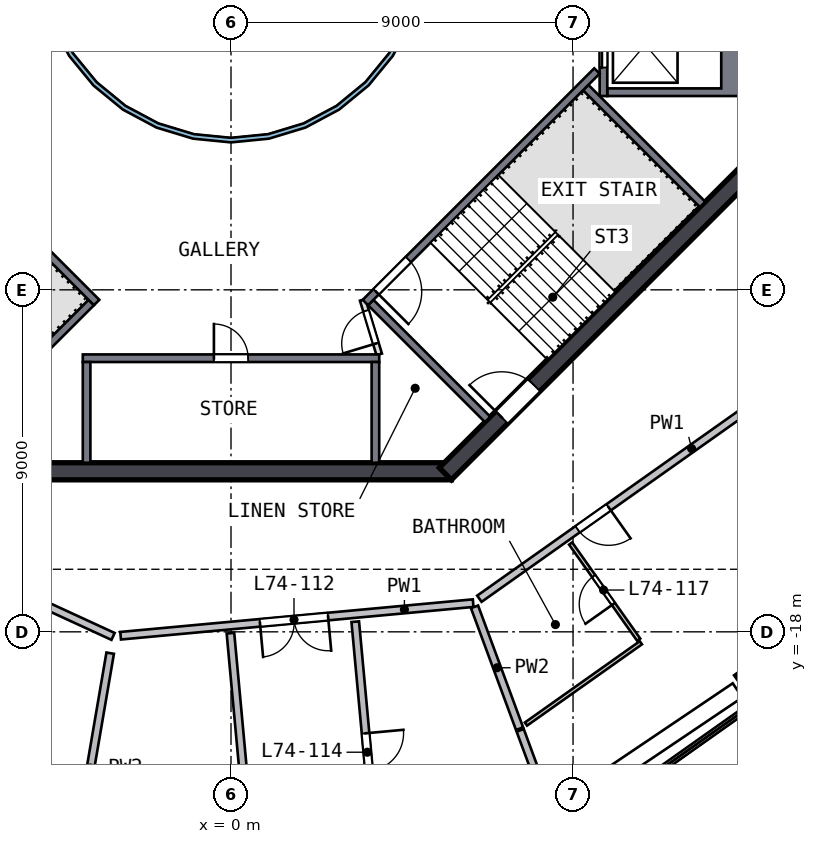
"""IFC4 building model, lengths in metres.
Left out: names, types, materials, properties, quantities, classifications, styles, units other than length and angle.
Written with IfcOpenShell. Run it as: python <this file> out.ifc"""

import sys

from ifc_helpers import new_model, si_unit, direction, frame, frame_2d, origin, origin_2d, place, context, subcontext, project, spatial, polyline, rectangle, outline, extrude, element, fill, save


model = new_model("IFC4")
c1 = context("Model", 3, precision=1e-05, world=origin(), true_north=direction((0.0, 1.0)))
c2 = subcontext(c1, "Body", "Model", "MODEL_VIEW")
j1 = project(units=[si_unit("LENGTHUNIT", "METRE"), si_unit("PLANEANGLEUNIT", "RADIAN")], contexts=[c1])
p1 = place(None, origin())
s1 = spatial("IfcSite", under=j1, at=p1, CompositionType="ELEMENT")
p2 = place(p1, origin())
s2 = spatial("IfcBuilding", under=s1, at=p2, CompositionType="ELEMENT")
p3 = place(p2, frame((0.0, 0.0, 299.5)))
s3 = spatial("IfcBuildingStorey", under=s2, at=p3, CompositionType="ELEMENT", Elevation=299.5)
p4 = place(p3, frame((13.664, -19.313, 0.0), z_axis=(0.09133384, 0.065781659, 0.99364526), x_axis=(0.811187112, 0.573853007, -0.112553082)))
e1 = element("IfcColumn", 1, at=p4, inside=s3, PredefinedType="COLUMN", context=c2, shape_type="SweptSolid", body=[
    extrude(rectangle(XDim=0.7, YDim=0.7, at=origin_2d()), origin(), (0.0, 0.0, 1.0), 3.21),
])
p5 = place(p3, frame((-5.799, -13.775, 0.0), z_axis=(0.0, 0.0, 1.0), x_axis=(1.0, 0.0, 0.0)))
e2 = element("IfcWall", 2, at=p5, inside=s3, PredefinedType="SHEAR", context=c2, shape_type="SweptSolid", body=[
    extrude(rectangle(XDim=11.598, YDim=0.45, at=frame_2d((5.799, 0.0))), origin(), (0.0, 0.0, 1.0), 3.5),
])
p6 = place(p3, frame((5.64, -13.841, 0.0), z_axis=(0.0, 0.0, 1.0), x_axis=(0.707106781, 0.707106781, 0.0)))
e3 = element("IfcWall", 3, at=p6, inside=s3, PredefinedType="SHEAR", context=c2, shape_type="SweptSolid", body=[
    extrude(rectangle(XDim=11.598, YDim=0.45, at=frame_2d((5.799, 0.0))), origin(), (0.0, 0.0, 1.0), 3.5),
])
p7 = place(p6, frame((2.099, 0.0, 0.0)))
e4 = element("IfcOpeningElement", 4, at=p7, cuts=e3, PredefinedType="OPENING", context=c2, shape_type="SweptSolid", body=[
    extrude(rectangle(XDim=1.2, YDim=2.1, at=frame_2d((0.6, 1.05))), frame((0.0, 0.235, 0.0), z_axis=(0.0, -1.0, 0.0), x_axis=(1.0, 0.0, 0.0)), (0.0, 0.0, 1.0), 0.47),
])
p8 = place(p3, origin())
e5 = element("IfcWall", 5, at=p8, inside=s3, PredefinedType="SOLIDWALL", context=c2, shape_type="SweptSolid", body=[
    extrude(outline(polyline([(13.55, -3.9), (9.9, -3.9), (9.9, -3.7), (12.9, -3.7), (12.9, -1.4), (9.9, -1.4), (9.9, -1.2), (13.55, -1.2), (13.55, -3.9)])), origin(), (0.0, 0.0, 1.0), 3.19),
])
p9 = place(p3, frame((9.8, -1.2, 0.0), z_axis=(0.0, 0.0, 1.0), x_axis=(0.0, -1.0, 0.0)))
e6 = element("IfcWall", 6, at=p9, inside=s3, PredefinedType="SOLIDWALL", context=c2, shape_type="SweptSolid", body=[
    extrude(rectangle(XDim=2.7, YDim=0.2, at=frame_2d((1.35, 0.0))), origin(), (0.0, 0.0, 1.0), 3.19),
])
p10 = place(p9, frame((0.75, 0.0, 0.0)))
e7 = element("IfcOpeningElement", 7, at=p10, cuts=e6, PredefinedType="OPENING", context=c2, shape_type="SweptSolid", body=[
    extrude(rectangle(XDim=1.2, YDim=2.1, at=frame_2d((0.6, 1.05))), frame((0.0, 0.11, 0.0), z_axis=(0.0, -1.0, 0.0), x_axis=(1.0, 0.0, 0.0)), (0.0, 0.0, 1.0), 0.22),
])
p11 = place(p3, frame((-3.9, -10.8, 0.0), z_axis=(0.0, 0.0, 1.0), x_axis=(1.0, 0.0, 0.0)))
e8 = element("IfcWall", 8, at=p11, inside=s3, PredefinedType="SOLIDWALL", context=c2, shape_type="SweptSolid", body=[
    extrude(rectangle(XDim=7.8, YDim=0.2, at=frame_2d((3.9, 0.0))), origin(), (0.0, 0.0, 1.0), 3.19),
])
p12 = place(p11, frame((3.45, 0.0, 0.0)))
e9 = element("IfcOpeningElement", 9, at=p12, cuts=e8, PredefinedType="OPENING", context=c2, shape_type="SweptSolid", body=[
    extrude(rectangle(XDim=0.9, YDim=2.1, at=frame_2d((0.45, 1.05))), frame((0.0, 0.11, 0.0), z_axis=(0.0, -1.0, 0.0), x_axis=(1.0, 0.0, 0.0)), (0.0, 0.0, 1.0), 0.22),
])
for number, where, z_axis, x_axis in (
    (10, (-3.8, -10.9, 0.0), (0.0, 0.0, 1.0), (0.0, -1.0, 0.0)),
    (11, (3.8, -10.9, 0.0), (0.0, 0.0, 1.0), (0.0, -1.0, 0.0)),
):
    element("IfcWall", number, at=place(p3, frame(where, z_axis=z_axis, x_axis=x_axis)), inside=s3, PredefinedType="SOLIDWALL", context=c2, shape_type="SweptSolid", body=[
        extrude(rectangle(XDim=2.65, YDim=0.2, at=frame_2d((1.325, 0.0))), origin(), (0.0, 0.0, 1.0), 3.19),
    ])
p13 = place(p3, frame((-3.535, -9.334, 0.0), z_axis=(0.0, 0.0, 1.0), x_axis=(-0.707120946, 0.707092617, 0.0)))
e12 = element("IfcWall", 12, at=p13, inside=s3, PredefinedType="SOLIDWALL", context=c2, shape_type="SweptSolid", body=[
    extrude(rectangle(XDim=8.618, YDim=0.2, at=frame_2d((4.309, 0.0))), origin(), (0.0, 0.0, 1.0), 3.19),
])
p14 = place(p13, frame((6.6, 0.0, 0.0)))
e13 = element("IfcOpeningElement", 13, at=p14, cuts=e12, PredefinedType="OPENING", context=c2, shape_type="SweptSolid", body=[
    extrude(rectangle(XDim=1.2, YDim=2.1, at=frame_2d((0.6, 1.05))), frame((0.0, 0.11, 0.0), z_axis=(0.0, -1.0, 0.0), x_axis=(1.0, 0.0, 0.0)), (0.0, 0.0, 1.0), 0.22),
])
p15 = place(p3, frame((-3.677, -9.334, 0.0), z_axis=(0.0, 0.0, 1.0), x_axis=(-0.707106781, -0.707106781, 0.0)))
e14 = element("IfcWall", 14, at=p15, inside=s3, PredefinedType="SOLIDWALL", context=c2, shape_type="SweptSolid", body=[
    extrude(rectangle(XDim=4.35, YDim=0.2, at=frame_2d((2.175, 0.0))), origin(), (0.0, 0.0, 1.0), 3.19),
])
p16 = place(p3, frame((9.629, -3.24, 0.0), z_axis=(0.0, 0.0, 1.0), x_axis=(-0.707120946, -0.707092617, 0.0)))
e15 = element("IfcWall", 15, at=p16, inside=s3, PredefinedType="SOLIDWALL", context=c2, shape_type="SweptSolid", body=[
    extrude(rectangle(XDim=8.618, YDim=0.2, at=frame_2d((4.309, 0.0))), origin(), (0.0, 0.0, 1.0), 3.19),
])
p17 = place(p16, frame((7.018, 0.0, 0.0)))
e16 = element("IfcOpeningElement", 16, at=p17, cuts=e15, PredefinedType="OPENING", context=c2, shape_type="SweptSolid", body=[
    extrude(rectangle(XDim=1.2, YDim=2.1, at=frame_2d((0.6, 1.05))), frame((0.0, 0.11, 0.0), z_axis=(0.0, -1.0, 0.0), x_axis=(1.0, 0.0, 0.0)), (0.0, 0.0, 1.0), 0.22),
])
for number, where, z_axis, x_axis in (
    (17, (3.677, -9.334, 0.0), (0.0, 0.0, 1.0), (0.707, -0.707, 0.0)),
    (18, (9.334, -3.677, 0.0), (0.0, 0.0, 1.0), (0.707, -0.707, 0.0)),
):
    element("IfcWall", number, at=place(p3, frame(where, z_axis=z_axis, x_axis=x_axis)), inside=s3, PredefinedType="SOLIDWALL", context=c2, shape_type="SweptSolid", body=[
        extrude(rectangle(XDim=4.35, YDim=0.2, at=frame_2d((2.175, 0.0))), origin(), (0.0, 0.0, 1.0), 3.19),
    ])
p18 = place(p3, frame((3.9, -10.7, 0.0), z_axis=(0.0, 0.0, 1.0), x_axis=(-0.289808785, 0.957084567, 0.0)))
e19 = element("IfcWall", 19, at=p18, inside=s3, PredefinedType="PARTITIONING", context=c2, shape_type="SweptSolid", body=[
    extrude(rectangle(XDim=1.501, YDim=0.15, at=frame_2d((0.75, 0.0))), origin(), (0.0, 0.0, 1.0), 3.19),
])
p19 = place(p18, frame((0.301, 0.0, 0.0)))
e20 = element("IfcOpeningElement", 20, at=p19, cuts=e19, PredefinedType="OPENING", context=c2, shape_type="SweptSolid", body=[
    extrude(rectangle(XDim=0.9, YDim=2.1, at=frame_2d((0.45, 1.05))), frame((0.0, 0.085, 0.0), z_axis=(0.0, -1.0, 0.0), x_axis=(1.0, 0.0, 0.0)), (0.0, 0.0, 1.0), 0.17),
])
p20 = place(p3, origin())
e21 = element("IfcWall", 21, at=p20, inside=s3, PredefinedType="SOLIDWALL", context=c2, shape_type="SweptSolid", body=[
    extrude(outline(polyline([(5.021, -0.999), (4.73, -1.959), (4.257, -2.844), (3.62, -3.62), (2.844, -4.257), (1.959, -4.73), (0.999, -5.021), (0.0, -5.12), (-0.999, -5.021), (-1.959, -4.73), (-2.844, -4.257), (-3.62, -3.62), (-4.257, -2.844), (-4.73, -1.959), (-5.021, -0.999), (-5.12, 0.0), (-5.021, 0.999), (-4.73, 1.959), (-4.257, 2.844), (-3.62, 3.62), (-2.844, 4.257), (-1.959, 4.73), (-0.999, 5.021), (0.0, 5.12), (0.999, 5.021), (1.959, 4.73), (2.844, 4.257), (3.62, 3.62), (4.257, 2.844), (4.73, 1.959), (5.021, 0.999), (5.12, 0.0), (5.021, -0.999)]), holes=[polyline([(4.904, 0.976), (4.619, 1.913), (4.157, 2.778), (3.535, 3.535), (2.778, 4.157), (1.913, 4.619), (0.976, 4.904), (0.0, 5.0), (-0.976, 4.904), (-1.913, 4.619), (-2.778, 4.157), (-3.535, 3.535), (-4.157, 2.778), (-4.619, 1.913), (-4.904, 0.976), (-5.0, 0.0), (-4.904, -0.976), (-4.619, -1.913), (-4.157, -2.778), (-3.535, -3.535), (-2.778, -4.157), (-1.913, -4.619), (-0.976, -4.904), (0.0, -5.0), (0.976, -4.904), (1.913, -4.619), (2.778, -4.157), (3.535, -3.535), (4.157, -2.778), (4.619, -1.913), (4.904, -0.976), (5.0, 0.0), (4.904, 0.976)])]), origin(), (0.0, 0.0, 1.0), 3.19),
])
p21 = place(p3, frame((-3.104, -18.121, 0.0), z_axis=(0.0, 0.0, 1.0), x_axis=(-0.908365452, 0.418177241, 0.0)))
e22 = element("IfcWall", 22, at=p21, inside=s3, PredefinedType="SOLIDWALL", context=c2, shape_type="SweptSolid", body=[
    extrude(rectangle(XDim=9.317, YDim=0.2, at=frame_2d((4.658, 0.0))), origin(), (0.0, 0.0, 1.0), 3.19),
])
p22 = place(p21, frame((5.15, 0.0, 0.0)))
e23 = element("IfcOpeningElement", 23, at=p22, cuts=e22, PredefinedType="OPENING", context=c2, shape_type="SweptSolid", body=[
    extrude(rectangle(XDim=1.0, YDim=2.1, at=frame_2d((0.5, 1.05))), frame((0.0, 0.11, 0.0), z_axis=(0.0, -1.0, 0.0), x_axis=(1.0, 0.0, 0.0)), (0.0, 0.0, 1.0), 0.22),
])
p23 = place(p3, frame((6.372, -17.245, 0.0), z_axis=(0.0, 0.0, 1.0), x_axis=(-0.995756119, -0.092031251, 0.0)))
e24 = element("IfcWall", 24, at=p23, inside=s3, PredefinedType="SOLIDWALL", context=c2, shape_type="SweptSolid", body=[
    extrude(rectangle(XDim=9.317, YDim=0.2, at=frame_2d((4.658, 0.0))), origin(), (0.0, 0.0, 1.0), 3.19),
])
p24 = place(p23, frame((3.835, 0.0, 0.0)))
e25 = element("IfcOpeningElement", 25, at=p24, cuts=e24, PredefinedType="OPENING", context=c2, shape_type="SweptSolid", body=[
    extrude(rectangle(XDim=1.8, YDim=2.1, at=frame_2d((0.9, 1.05))), frame((0.0, 0.11, 0.0), z_axis=(0.0, -1.0, 0.0), x_axis=(1.0, 0.0, 0.0)), (0.0, 0.0, 1.0), 0.22),
])
p25 = place(p3, frame((14.141, -11.749, 0.0), z_axis=(0.0, 0.0, 1.0), x_axis=(-0.816328241, -0.577588264, 0.0)))
e26 = element("IfcWall", 26, at=p25, inside=s3, PredefinedType="SOLIDWALL", context=c2, shape_type="SweptSolid", body=[
    extrude(rectangle(XDim=9.316, YDim=0.2, at=frame_2d((4.658, 0.0))), origin(), (0.0, 0.0, 1.0), 3.19),
])
p26 = place(p25, frame((5.15, 0.0, 0.0)))
e27 = element("IfcOpeningElement", 27, at=p26, cuts=e26, PredefinedType="OPENING", context=c2, shape_type="SweptSolid", body=[
    extrude(rectangle(XDim=1.0, YDim=2.1, at=frame_2d((0.5, 1.05))), frame((0.0, 0.11, 0.0), z_axis=(0.0, -1.0, 0.0), x_axis=(1.0, 0.0, 0.0)), (0.0, 0.0, 1.0), 0.22),
])
p27 = place(p3, frame((-4.215, -24.606, 0.0), z_axis=(0.0, 0.0, 1.0), x_axis=(0.168845576, 0.985642517, 0.0)))
e28 = element("IfcWall", 28, at=p27, inside=s3, PredefinedType="SOLIDWALL", context=c2, shape_type="SweptSolid", body=[
    extrude(rectangle(XDim=6.132, YDim=0.2, at=frame_2d((3.066, 0.0))), origin(), (0.0, 0.0, 1.0), 3.19),
])
p28 = place(p3, frame((0.933, -28.294, 0.0), z_axis=(0.0, 0.0, 1.0), x_axis=(-0.092020677, 0.995757096, 0.0)))
e29 = element("IfcWall", 29, at=p28, inside=s3, PredefinedType="SOLIDWALL", context=c2, shape_type="SweptSolid", body=[
    extrude(rectangle(XDim=10.302, YDim=0.2, at=frame_2d((5.151, 0.0))), origin(), (0.0, 0.0, 1.0), 3.19),
])
p29 = place(p28, frame((2.5, 0.0, 0.0)))
e30 = element("IfcOpeningElement", 30, at=p29, cuts=e29, PredefinedType="OPENING", context=c2, shape_type="SweptSolid", body=[
    extrude(rectangle(XDim=1.0, YDim=2.1, at=frame_2d((0.5, 1.05))), frame((0.0, 0.11, 0.0), z_axis=(0.0, -1.0, 0.0), x_axis=(1.0, 0.0, 0.0)), (0.0, 0.0, 1.0), 0.22),
])
p30 = place(p3, frame((3.269, -17.733, 0.0), z_axis=(0.0, 0.0, 1.0), x_axis=(0.092020677, -0.995757096, 0.0)))
e31 = element("IfcWall", 31, at=p30, inside=s3, PredefinedType="SOLIDWALL", context=c2, shape_type="SweptSolid", body=[
    extrude(rectangle(XDim=10.302, YDim=0.2, at=frame_2d((5.151, 0.0))), origin(), (0.0, 0.0, 1.0), 3.19),
])
p31 = place(p30, frame((2.95, 0.0, 0.0)))
e32 = element("IfcOpeningElement", 32, at=p31, cuts=e31, PredefinedType="OPENING", context=c2, shape_type="SweptSolid", body=[
    extrude(rectangle(XDim=1.0, YDim=2.1, at=frame_2d((0.5, 1.05))), frame((0.0, 0.11, 0.0), z_axis=(0.0, -1.0, 0.0), x_axis=(1.0, 0.0, 0.0)), (0.0, 0.0, 1.0), 0.22),
])
p32 = place(p3, frame((6.408, -17.342, 0.0), z_axis=(0.0, 0.0, 1.0), x_axis=(0.34661872, -0.93800611, 0.0)))
e33 = element("IfcWall", 33, at=p32, inside=s3, PredefinedType="SOLIDWALL", context=c2, shape_type="SweptSolid", body=[
    extrude(rectangle(XDim=3.418, YDim=0.2, at=frame_2d((1.709, 0.0))), origin(), (0.0, 0.0, 1.0), 3.19),
])
p33 = place(p3, frame((7.609, -20.592, 0.0), z_axis=(0.0, 0.0, 1.0), x_axis=(0.346659445, -0.93799106, 0.0)))
e34 = element("IfcWall", 34, at=p33, inside=s3, PredefinedType="SOLIDWALL", context=c2, shape_type="SweptSolid", body=[
    extrude(rectangle(XDim=3.011, YDim=0.2, at=frame_2d((1.506, 0.0))), origin(), (0.0, 0.0, 1.0), 2.69),
])
p34 = place(p3, frame((10.785, -18.288, 0.0), z_axis=(0.0, 0.0, 1.0), x_axis=(-0.816326196, -0.577591155, 0.0)))
e35 = element("IfcWall", 35, at=p34, inside=s3, PredefinedType="PARTITIONING", context=c2, shape_type="SweptSolid", body=[
    extrude(rectangle(XDim=3.704, YDim=0.1, at=frame_2d((1.852, 0.0))), origin(), (0.0, 0.0, 1.0), 3.19),
])
p35 = place(p3, frame((10.727, -18.206, 0.0), z_axis=(0.0, 0.0, 1.0), x_axis=(-0.57760427, 0.816316916, 0.0)))
e36 = element("IfcWall", 36, at=p35, inside=s3, PredefinedType="PARTITIONING", context=c2, shape_type="SweptSolid", body=[
    extrude(rectangle(XDim=3.1, YDim=0.1, at=frame_2d((1.55, 0.0))), origin(), (0.0, 0.0, 1.0), 3.19),
])
p36 = place(p35, frame((1.15, 0.0, 0.0)))
e37 = element("IfcOpeningElement", 37, at=p36, cuts=e36, PredefinedType="OPENING", context=c2, shape_type="SweptSolid", body=[
    extrude(rectangle(XDim=0.9, YDim=2.1, at=frame_2d((0.45, 1.05))), frame((0.0, 0.06, 0.0), z_axis=(0.0, -1.0, 0.0), x_axis=(1.0, 0.0, 0.0)), (0.0, 0.0, 1.0), 0.12),
])
p37 = place(p12, origin())
e38 = element("IfcDoor", 38, at=p37, inside=s3, OperationType="SINGLE_SWING_LEFT", PredefinedType="DOOR", context=c2, shape_type="SweptSolid", body=[
    extrude(rectangle(XDim=0.9, YDim=2.1, at=frame_2d((0.45, 1.05))), frame((0.0, 0.025, 0.0), z_axis=(0.0, -1.0, 0.0), x_axis=(1.0, 0.0, 0.0)), (0.0, 0.0, 1.0), 0.05),
])
fill(e9, e38)
p38 = place(p10, origin())
e39 = element("IfcDoor", 39, at=p38, inside=s3, OperationType="DOUBLE_DOOR_SLIDING", PredefinedType="DOOR", context=c2, shape_type="SweptSolid", body=[
    extrude(rectangle(XDim=1.2, YDim=2.1, at=frame_2d((0.6, 1.05))), frame((0.0, 0.025, 0.0), z_axis=(0.0, -1.0, 0.0), x_axis=(1.0, 0.0, 0.0)), (0.0, 0.0, 1.0), 0.05),
])
fill(e7, e39)
p39 = place(p17, origin())
e40 = element("IfcDoor", 40, at=p39, inside=s3, OperationType="SINGLE_SWING_RIGHT", PredefinedType="DOOR", context=c2, shape_type="SweptSolid", body=[
    extrude(rectangle(XDim=1.2, YDim=2.1, at=frame_2d((0.6, 1.05))), frame((0.0, 0.025, 0.0), z_axis=(0.0, -1.0, 0.0), x_axis=(1.0, 0.0, 0.0)), (0.0, 0.0, 1.0), 0.05),
])
fill(e16, e40)
p40 = place(p7, origin())
e41 = element("IfcDoor", 41, at=p40, inside=s3, OperationType="SINGLE_SWING_LEFT", PredefinedType="DOOR", context=c2, shape_type="SweptSolid", body=[
    extrude(rectangle(XDim=1.2, YDim=2.1, at=frame_2d((0.6, 1.05))), frame((0.0, 0.025, 0.0), z_axis=(0.0, -1.0, 0.0), x_axis=(1.0, 0.0, 0.0)), (0.0, 0.0, 1.0), 0.05),
])
fill(e4, e41)
p41 = place(p19, origin())
e42 = element("IfcDoor", 42, at=p41, inside=s3, OperationType="SINGLE_SWING_LEFT", PredefinedType="DOOR", context=c2, shape_type="SweptSolid", body=[
    extrude(rectangle(XDim=0.9, YDim=2.1, at=frame_2d((0.45, 1.05))), frame((0.0, 0.025, 0.0), z_axis=(0.0, -1.0, 0.0), x_axis=(1.0, 0.0, 0.0)), (0.0, 0.0, 1.0), 0.05),
])
fill(e20, e42)
p42 = place(p24, origin())
e43 = element("IfcDoor", 43, at=p42, inside=s3, OperationType="DOUBLE_DOOR_SINGLE_SWING", PredefinedType="DOOR", context=c2, shape_type="SweptSolid", body=[
    extrude(rectangle(XDim=1.8, YDim=2.1, at=frame_2d((0.9, 1.05))), frame((0.0, 0.025, 0.0), z_axis=(0.0, -1.0, 0.0), x_axis=(1.0, 0.0, 0.0)), (0.0, 0.0, 1.0), 0.05),
])
fill(e25, e43)
p43 = place(p31, origin())
e44 = element("IfcDoor", 44, at=p43, inside=s3, OperationType="SINGLE_SWING_LEFT", PredefinedType="DOOR", context=c2, shape_type="SweptSolid", body=[
    extrude(rectangle(XDim=1.0, YDim=2.1, at=frame_2d((0.5, 1.05))), frame((0.0, 0.025, 0.0), z_axis=(0.0, -1.0, 0.0), x_axis=(1.0, 0.0, 0.0)), (0.0, 0.0, 1.0), 0.05),
])
fill(e32, e44)
p44 = place(p26, origin())
e45 = element("IfcDoor", 45, at=p44, inside=s3, OperationType="SINGLE_SWING_LEFT", PredefinedType="DOOR", context=c2, shape_type="SweptSolid", body=[
    extrude(rectangle(XDim=1.0, YDim=2.1, at=frame_2d((0.5, 1.05))), frame((0.0, 0.025, 0.0), z_axis=(0.0, -1.0, 0.0), x_axis=(1.0, 0.0, 0.0)), (0.0, 0.0, 1.0), 0.05),
])
fill(e27, e45)
p45 = place(p36, origin())
e46 = element("IfcDoor", 46, at=p45, inside=s3, OperationType="SINGLE_SWING_LEFT", PredefinedType="DOOR", context=c2, shape_type="SweptSolid", body=[
    extrude(rectangle(XDim=0.9, YDim=2.1, at=frame_2d((0.45, 1.05))), frame((0.0, 0.025, 0.0), z_axis=(0.0, -1.0, 0.0), x_axis=(1.0, 0.0, 0.0)), (0.0, 0.0, 1.0), 0.05),
])
fill(e37, e46)
save(model, sys.argv[1])
